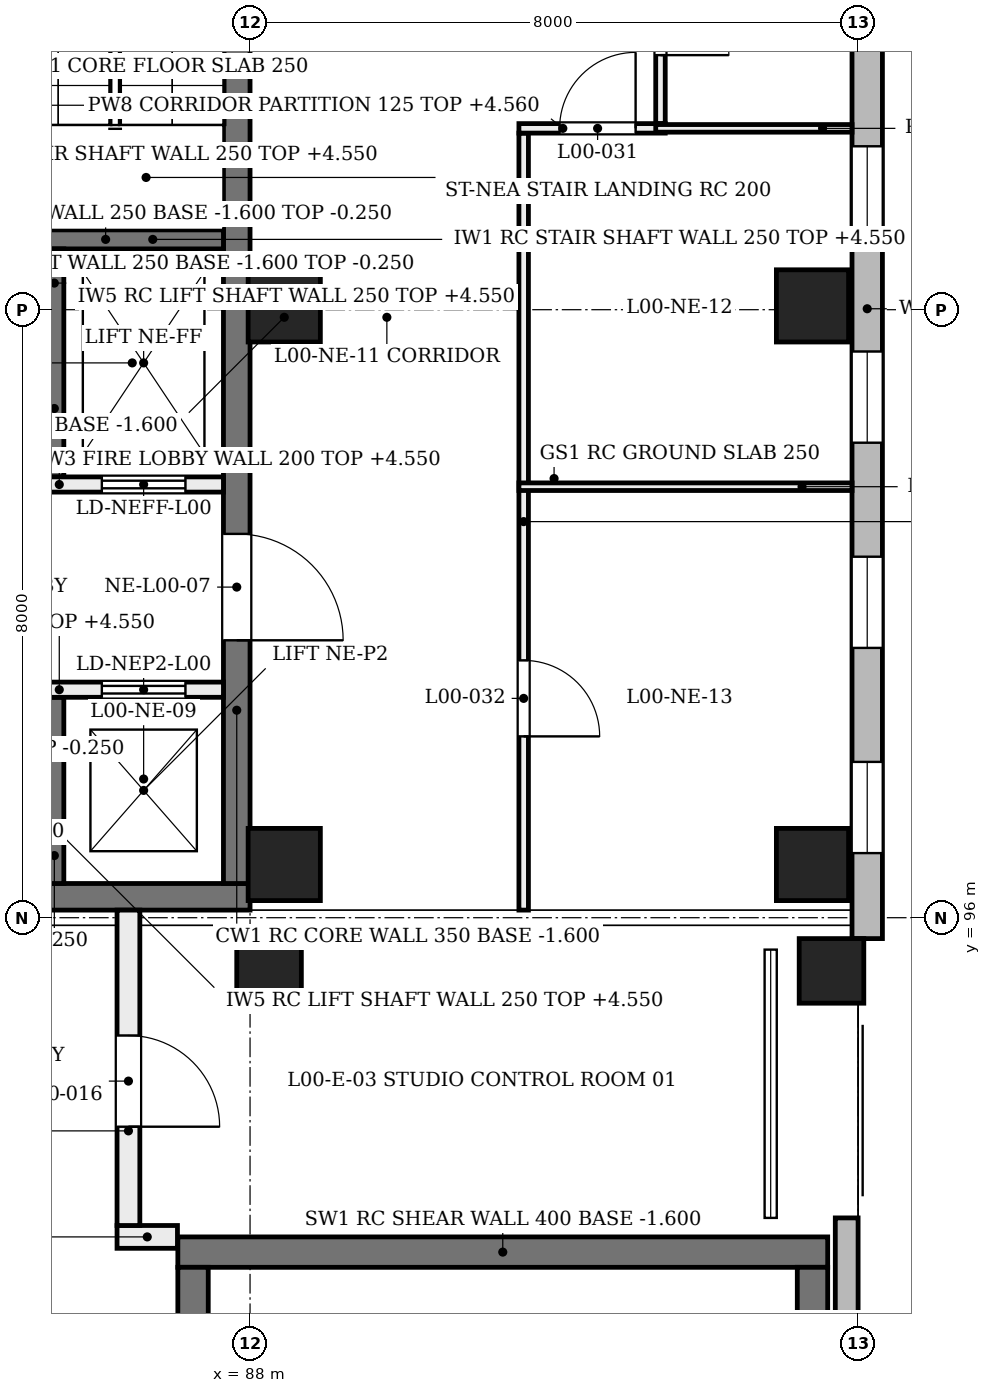
"""IFC4 building model, lengths in metres.
Left out: names, types, materials, properties, quantities, classifications, styles, units other than length and angle.
Written with IfcOpenShell. Run it as: python <this file> out.ifc"""

import sys

from ifc_helpers import new_model, si_unit, direction, frame, frame_2d, origin, origin_2d, place, context, subcontext, project, spatial, rectangle, extrude, element, fill, save


model = new_model("IFC4")
c1 = context("Model", 3, precision=1e-05, world=origin(), true_north=direction((0.0, 1.0)))
c2 = subcontext(c1, "Body", "Model", "MODEL_VIEW")
j1 = project(units=[si_unit("LENGTHUNIT", "METRE"), si_unit("PLANEANGLEUNIT", "RADIAN")], contexts=[c1])
p1 = place(None, origin())
s1 = spatial("IfcSite", under=j1, at=p1, CompositionType="ELEMENT")
p2 = place(p1, origin())
s2 = spatial("IfcBuilding", under=s1, at=p2, CompositionType="ELEMENT")
p3 = place(p2, origin())
s3 = spatial("IfcBuildingStorey", under=s2, at=p3, CompositionType="ELEMENT", Elevation=0.0)
p4 = place(p3, frame((87.05, 91.6, -1.6), z_axis=(0.0, 0.0, 1.0), x_axis=(1.0, 0.0, 0.0)))
e1 = element("IfcWall", 1, at=p4, inside=s3, PredefinedType="SHEAR", context=c2, shape_type="SweptSolid", body=[
    extrude(rectangle(XDim=8.55, YDim=0.4, at=frame_2d((4.275, 0.0))), origin(), (0.0, 0.0, 1.0), 6.18),
])
p5 = place(p3, frame((87.25, 75.8, -1.6), z_axis=(0.0, 0.0, 1.0), x_axis=(0.0, 1.0, 0.0)))
e2 = element("IfcWall", 2, at=p5, inside=s3, PredefinedType="SHEAR", context=c2, shape_type="SweptSolid", body=[
    extrude(rectangle(XDim=15.6, YDim=0.4, at=frame_2d((7.8, 0.0))), origin(), (0.0, 0.0, 1.0), 6.18),
])
p6 = place(p5, frame((6.987, 0.0, 1.6)))
e3 = element("IfcOpeningElement", 3, at=p6, cuts=e2, PredefinedType="OPENING", context=c2, shape_type="SweptSolid", body=[
    extrude(rectangle(XDim=1.4, YDim=2.4, at=frame_2d((0.7, 1.2))), frame((0.0, 0.21, 0.0), z_axis=(0.0, -1.0, 0.0), x_axis=(1.0, 0.0, 0.0)), (0.0, 0.0, 1.0), 0.42),
])
p7 = place(p3, frame((95.4, 75.8, -1.6), z_axis=(0.0, 0.0, 1.0), x_axis=(0.0, 1.0, 0.0)))
e4 = element("IfcWall", 4, at=p7, inside=s3, PredefinedType="SHEAR", context=c2, shape_type="SweptSolid", body=[
    extrude(rectangle(XDim=15.6, YDim=0.4, at=frame_2d((7.8, 0.0))), origin(), (0.0, 0.0, 1.0), 6.18),
])
p8 = place(p3, frame((79.725, 96.275, -1.6), z_axis=(0.0, 0.0, 1.0), x_axis=(1.0, 0.0, 0.0)))
e5 = element("IfcWall", 5, at=p8, inside=s3, PredefinedType="SHEAR", context=c2, shape_type="SweptSolid", body=[
    extrude(rectangle(XDim=8.275, YDim=0.35, at=frame_2d((4.137, 0.0))), origin(), (0.0, 0.0, 1.0), 6.18),
])
p9 = place(p3, frame((87.825, 96.45, -1.6), z_axis=(0.0, 0.0, 1.0), x_axis=(0.0, 1.0, 0.0)))
e6 = element("IfcWall", 6, at=p9, inside=s3, PredefinedType="SHEAR", context=c2, shape_type="SweptSolid", body=[
    extrude(rectangle(XDim=15.2, YDim=0.35, at=frame_2d((7.6, 0.0))), origin(), (0.0, 0.0, 1.0), 6.18),
])
p10 = place(p9, frame((13.25, 0.0, 1.6)))
e7 = element("IfcOpeningElement", 7, at=p10, cuts=e6, PredefinedType="OPENING", context=c2, shape_type="SweptSolid", body=[
    extrude(rectangle(XDim=1.0, YDim=2.1, at=frame_2d((0.5, 1.05))), frame((0.0, 0.185, 0.0), z_axis=(0.0, -1.0, 0.0), x_axis=(1.0, 0.0, 0.0)), (0.0, 0.0, 1.0), 0.37),
])
p11 = place(p9, frame((3.2, 0.0, 1.6)))
e8 = element("IfcOpeningElement", 8, at=p11, cuts=e6, PredefinedType="OPENING", context=c2, shape_type="SweptSolid", body=[
    extrude(rectangle(XDim=1.4, YDim=2.1, at=frame_2d((0.7, 1.05))), frame((0.0, 0.185, 0.0), z_axis=(0.0, -1.0, 0.0), x_axis=(1.0, 0.0, 0.0)), (0.0, 0.0, 1.0), 0.37),
])
for number, where, z_axis, x_axis in (
    (9, (88.45, 96.7, -1.6), (0.0, 0.0, 1.0), (1.0, 0.0, 0.0)),
    (10, (88.45, 104.05, -1.6), (0.0, 0.0, 1.0), (1.0, 0.0, 0.0)),
    (11, (95.4, 96.7, -1.6), (0.0, 0.0, 1.0), (1.0, 0.0, 0.0)),
    (12, (95.4, 104.05, -1.6), (0.0, 0.0, 1.0), (1.0, 0.0, 0.0)),
):
    element("IfcColumn", number, at=place(p3, frame(where, z_axis=z_axis, x_axis=x_axis)), inside=s3, PredefinedType="COLUMN", context=c2, shape_type="SweptSolid", body=[
        extrude(rectangle(XDim=0.95, YDim=0.95, at=origin_2d()), origin(), (0.0, 0.0, 1.0), 6.4),
    ])
for number, where, z_axis, x_axis in (
    (13, (87.667, 95.3, -1.6), (0.204, 0.0, 0.979), (0.0, 1.0, 0.0)),
    (14, (95.067, 95.3, -1.6), (0.204, 0.0, 0.979), (0.0, 1.0, 0.0)),
):
    element("IfcColumn", number, at=place(p3, frame(where, z_axis=z_axis, x_axis=x_axis)), inside=s3, PredefinedType="COLUMN", context=c2, shape_type="SweptSolid", body=[
        extrude(rectangle(XDim=0.85, YDim=0.85, at=origin_2d()), origin(), (0.0, 0.0, 1.0), 6.538),
    ])
p12 = place(p3, frame((95.85, 71.35, 0.0), z_axis=(0.0, 0.0, 1.0), x_axis=(0.0, 1.0, 0.0)))
e15 = element("IfcWall", 15, at=p12, inside=s3, PredefinedType="SOLIDWALL", context=c2, shape_type="SweptSolid", body=[
    extrude(rectangle(XDim=20.7, YDim=0.3, at=frame_2d((10.35, 0.0))), origin(), (0.0, 0.0, 1.0), 3.9),
])
p13 = place(p3, frame((96.12, 95.725, 0.0), z_axis=(0.0, 0.0, 1.0), x_axis=(0.0, 1.0, 0.0)))
e16 = element("IfcWall", 16, at=p13, inside=s3, PredefinedType="SOLIDWALL", context=c2, shape_type="SweptSolid", body=[
    extrude(rectangle(XDim=16.575, YDim=0.4, at=frame_2d((8.288, 0.0))), origin(), (0.0, 0.0, 1.0), 3.9),
])
p14 = place(p13, frame((1.125, 0.0, 1.9)))
e17 = element("IfcOpeningElement", 17, at=p14, cuts=e16, PredefinedType="OPENING", context=c2, shape_type="SweptSolid", body=[
    extrude(rectangle(XDim=1.2, YDim=1.5, at=frame_2d((0.6, 0.75))), frame((0.0, 0.21, 0.0), z_axis=(0.0, -1.0, 0.0), x_axis=(1.0, 0.0, 0.0)), (0.0, 0.0, 1.0), 0.42),
])
p15 = place(p13, frame((3.825, 0.0, 1.9)))
e18 = element("IfcOpeningElement", 18, at=p15, cuts=e16, PredefinedType="OPENING", context=c2, shape_type="SweptSolid", body=[
    extrude(rectangle(XDim=1.2, YDim=1.5, at=frame_2d((0.6, 0.75))), frame((0.0, 0.21, 0.0), z_axis=(0.0, -1.0, 0.0), x_axis=(1.0, 0.0, 0.0)), (0.0, 0.0, 1.0), 0.42),
])
p16 = place(p13, frame((6.525, 0.0, 1.9)))
e19 = element("IfcOpeningElement", 19, at=p16, cuts=e16, PredefinedType="OPENING", context=c2, shape_type="SweptSolid", body=[
    extrude(rectangle(XDim=1.2, YDim=1.5, at=frame_2d((0.6, 0.75))), frame((0.0, 0.21, 0.0), z_axis=(0.0, -1.0, 0.0), x_axis=(1.0, 0.0, 0.0)), (0.0, 0.0, 1.0), 0.42),
])
p17 = place(p13, frame((9.225, 0.0, 1.9)))
e20 = element("IfcOpeningElement", 20, at=p17, cuts=e16, PredefinedType="OPENING", context=c2, shape_type="SweptSolid", body=[
    extrude(rectangle(XDim=1.2, YDim=1.5, at=frame_2d((0.6, 0.75))), frame((0.0, 0.21, 0.0), z_axis=(0.0, -1.0, 0.0), x_axis=(1.0, 0.0, 0.0)), (0.0, 0.0, 1.0), 0.42),
])
p18 = place(p13, frame((11.925, 0.0, 1.9)))
e21 = element("IfcOpeningElement", 21, at=p18, cuts=e16, PredefinedType="OPENING", context=c2, shape_type="SweptSolid", body=[
    extrude(rectangle(XDim=1.2, YDim=1.5, at=frame_2d((0.6, 0.75))), frame((0.0, 0.21, 0.0), z_axis=(0.0, -1.0, 0.0), x_axis=(1.0, 0.0, 0.0)), (0.0, 0.0, 1.0), 0.42),
])
p19 = place(p13, frame((14.625, 0.0, 1.9)))
e22 = element("IfcOpeningElement", 22, at=p19, cuts=e16, PredefinedType="OPENING", context=c2, shape_type="SweptSolid", body=[
    extrude(rectangle(XDim=1.2, YDim=1.5, at=frame_2d((0.6, 0.75))), frame((0.0, 0.21, 0.0), z_axis=(0.0, -1.0, 0.0), x_axis=(1.0, 0.0, 0.0)), (0.0, 0.0, 1.0), 0.42),
])
p20 = place(p3, frame((87.65, 104.925, 0.0), z_axis=(0.0, 0.0, 1.0), x_axis=(-1.0, 0.0, 0.0)))
e23 = element("IfcWall", 23, at=p20, inside=s3, PredefinedType="SOLIDWALL", context=c2, shape_type="SweptSolid", body=[
    extrude(rectangle(XDim=3.1, YDim=0.25, at=frame_2d((1.55, 0.0))), origin(), (0.0, 0.0, 1.0), 4.55),
])
p21 = place(p3, frame((87.65, 104.925, -1.6), z_axis=(0.0, 0.0, 1.0), x_axis=(-1.0, 0.0, 0.0)))
e24 = element("IfcWall", 24, at=p21, inside=s3, PredefinedType="SOLIDWALL", context=c2, shape_type="SweptSolid", body=[
    extrude(rectangle(XDim=3.1, YDim=0.25, at=frame_2d((1.55, 0.0))), origin(), (0.0, 0.0, 1.0), 1.35),
])
p22 = place(p3, frame((85.425, 104.8, 0.0), z_axis=(0.0, 0.0, 1.0), x_axis=(0.0, -1.0, 0.0)))
e25 = element("IfcWall", 25, at=p22, inside=s3, PredefinedType="SOLIDWALL", context=c2, shape_type="SweptSolid", body=[
    extrude(rectangle(XDim=3.0, YDim=0.25, at=frame_2d((1.5, 0.0))), origin(), (0.0, 0.0, 1.0), 4.55),
])
p23 = place(p3, frame((85.425, 104.8, -1.6), z_axis=(0.0, 0.0, 1.0), x_axis=(0.0, -1.0, 0.0)))
e26 = element("IfcWall", 26, at=p23, inside=s3, PredefinedType="SOLIDWALL", context=c2, shape_type="SweptSolid", body=[
    extrude(rectangle(XDim=3.0, YDim=0.25, at=frame_2d((1.5, 0.0))), origin(), (0.0, 0.0, 1.0), 1.35),
])
p24 = place(p3, frame((85.425, 98.9, 0.0), z_axis=(0.0, 0.0, 1.0), x_axis=(0.0, -1.0, 0.0)))
e27 = element("IfcWall", 27, at=p24, inside=s3, PredefinedType="SOLIDWALL", context=c2, shape_type="SweptSolid", body=[
    extrude(rectangle(XDim=2.45, YDim=0.25, at=frame_2d((1.225, 0.0))), origin(), (0.0, 0.0, 1.0), 4.55),
])
p25 = place(p3, frame((85.425, 98.9, -1.6), z_axis=(0.0, 0.0, 1.0), x_axis=(0.0, -1.0, 0.0)))
e28 = element("IfcWall", 28, at=p25, inside=s3, PredefinedType="SOLIDWALL", context=c2, shape_type="SweptSolid", body=[
    extrude(rectangle(XDim=2.45, YDim=0.25, at=frame_2d((1.225, 0.0))), origin(), (0.0, 0.0, 1.0), 1.35),
])
p26 = place(p3, frame((87.65, 101.7, 0.0), z_axis=(0.0, 0.0, 1.0), x_axis=(-1.0, 0.0, 0.0)))
e29 = element("IfcWall", 29, at=p26, inside=s3, PredefinedType="SOLIDWALL", context=c2, shape_type="SweptSolid", body=[
    extrude(rectangle(XDim=7.2, YDim=0.2, at=frame_2d((3.6, 0.0))), origin(), (0.0, 0.0, 1.0), 4.55),
])
p27 = place(p26, frame((0.5, 0.0, 0.0)))
e30 = element("IfcOpeningElement", 30, at=p27, cuts=e29, PredefinedType="OPENING", context=c2, shape_type="SweptSolid", body=[
    extrude(rectangle(XDim=1.1, YDim=2.1, at=frame_2d((0.55, 1.05))), frame((0.0, 0.11, 0.0), z_axis=(0.0, -1.0, 0.0), x_axis=(1.0, 0.0, 0.0)), (0.0, 0.0, 1.0), 0.22),
])
p28 = place(p26, frame((5.6, 0.0, 0.0)))
e31 = element("IfcOpeningElement", 31, at=p28, cuts=e29, PredefinedType="OPENING", context=c2, shape_type="SweptSolid", body=[
    extrude(rectangle(XDim=1.1, YDim=2.1, at=frame_2d((0.55, 1.05))), frame((0.0, 0.11, 0.0), z_axis=(0.0, -1.0, 0.0), x_axis=(1.0, 0.0, 0.0)), (0.0, 0.0, 1.0), 0.22),
])
p29 = place(p26, frame((3.1, 0.0, 0.0)))
e32 = element("IfcOpeningElement", 32, at=p29, cuts=e29, PredefinedType="OPENING", context=c2, shape_type="SweptSolid", body=[
    extrude(rectangle(XDim=1.0, YDim=2.1, at=frame_2d((0.5, 1.05))), frame((0.0, 0.11, 0.0), z_axis=(0.0, -1.0, 0.0), x_axis=(1.0, 0.0, 0.0)), (0.0, 0.0, 1.0), 0.22),
])
p30 = place(p3, frame((87.65, 99.0, 0.0), z_axis=(0.0, 0.0, 1.0), x_axis=(-1.0, 0.0, 0.0)))
e33 = element("IfcWall", 33, at=p30, inside=s3, PredefinedType="SOLIDWALL", context=c2, shape_type="SweptSolid", body=[
    extrude(rectangle(XDim=7.2, YDim=0.2, at=frame_2d((3.6, 0.0))), origin(), (0.0, 0.0, 1.0), 4.55),
])
p31 = place(p30, frame((0.5, 0.0, 0.0)))
e34 = element("IfcOpeningElement", 34, at=p31, cuts=e33, PredefinedType="OPENING", context=c2, shape_type="SweptSolid", body=[
    extrude(rectangle(XDim=1.1, YDim=2.1, at=frame_2d((0.55, 1.05))), frame((0.0, 0.11, 0.0), z_axis=(0.0, -1.0, 0.0), x_axis=(1.0, 0.0, 0.0)), (0.0, 0.0, 1.0), 0.22),
])
p32 = place(p30, frame((5.6, 0.0, 0.0)))
e35 = element("IfcOpeningElement", 35, at=p32, cuts=e33, PredefinedType="OPENING", context=c2, shape_type="SweptSolid", body=[
    extrude(rectangle(XDim=1.1, YDim=2.1, at=frame_2d((0.55, 1.05))), frame((0.0, 0.11, 0.0), z_axis=(0.0, -1.0, 0.0), x_axis=(1.0, 0.0, 0.0)), (0.0, 0.0, 1.0), 0.22),
])
p33 = place(p30, frame((3.1, 0.0, 0.0)))
e36 = element("IfcOpeningElement", 36, at=p33, cuts=e33, PredefinedType="OPENING", context=c2, shape_type="SweptSolid", body=[
    extrude(rectangle(XDim=1.0, YDim=2.1, at=frame_2d((0.5, 1.05))), frame((0.0, 0.11, 0.0), z_axis=(0.0, -1.0, 0.0), x_axis=(1.0, 0.0, 0.0)), (0.0, 0.0, 1.0), 0.22),
])
p34 = place(p3, frame((86.25, 91.8, 0.0), z_axis=(0.0, 0.0, 1.0), x_axis=(1.0, 0.0, 0.0)))
e37 = element("IfcWall", 37, at=p34, inside=s3, PredefinedType="PARTITIONING", context=c2, shape_type="SweptSolid", body=[
    extrude(rectangle(XDim=0.795, YDim=0.3, at=frame_2d((0.397, 0.0))), origin(), (0.0, 0.0, 1.0), 4.56),
])
p35 = place(p3, frame((86.4, 91.95, 0.0), z_axis=(0.0, 0.0, 1.0), x_axis=(0.0, 1.0, 0.0)))
e38 = element("IfcWall", 38, at=p35, inside=s3, PredefinedType="PARTITIONING", context=c2, shape_type="SweptSolid", body=[
    extrude(rectangle(XDim=4.15, YDim=0.3, at=frame_2d((2.075, 0.0))), origin(), (0.0, 0.0, 1.0), 3.88),
])
p36 = place(p35, frame((1.3, 0.0, 0.0)))
e39 = element("IfcOpeningElement", 39, at=p36, cuts=e38, PredefinedType="OPENING", context=c2, shape_type="SweptSolid", body=[
    extrude(rectangle(XDim=1.2, YDim=2.2, at=frame_2d((0.6, 1.1))), frame((0.0, 0.16, 0.0), z_axis=(0.0, -1.0, 0.0), x_axis=(1.0, 0.0, 0.0)), (0.0, 0.0, 1.0), 0.32),
])
p37 = place(p3, frame((91.6, 96.1, 0.0), z_axis=(0.0, 0.0, 1.0), x_axis=(0.0, 1.0, 0.0)))
e40 = element("IfcWall", 40, at=p37, inside=s3, PredefinedType="PARTITIONING", context=c2, shape_type="SweptSolid", body=[
    extrude(rectangle(XDim=10.223, YDim=0.125, at=frame_2d((5.112, 0.0))), origin(), (0.0, 0.0, 1.0), 3.88),
])
p38 = place(p37, frame((2.286, 0.0, 0.0)))
e41 = element("IfcOpeningElement", 41, at=p38, cuts=e40, PredefinedType="OPENING", context=c2, shape_type="SweptSolid", body=[
    extrude(rectangle(XDim=1.0, YDim=2.1, at=frame_2d((0.5, 1.05))), frame((0.0, 0.073, 0.0), z_axis=(0.0, -1.0, 0.0), x_axis=(1.0, 0.0, 0.0)), (0.0, 0.0, 1.0), 0.145),
])
p39 = place(p3, frame((93.4, 106.448, 0.0), z_axis=(0.0, 0.0, 1.0), x_axis=(0.0, 1.0, 0.0)))
e42 = element("IfcWall", 42, at=p39, inside=s3, PredefinedType="PARTITIONING", context=c2, shape_type="SweptSolid", body=[
    extrude(rectangle(XDim=5.472, YDim=0.125, at=frame_2d((2.736, 0.0))), origin(), (0.0, 0.0, 1.0), 3.88),
])
p40 = place(p39, frame((3.559, 0.0, 0.0)))
e43 = element("IfcOpeningElement", 43, at=p40, cuts=e42, PredefinedType="OPENING", context=c2, shape_type="SweptSolid", body=[
    extrude(rectangle(XDim=0.9, YDim=2.1, at=frame_2d((0.45, 1.05))), frame((0.0, 0.073, 0.0), z_axis=(0.0, -1.0, 0.0), x_axis=(1.0, 0.0, 0.0)), (0.0, 0.0, 1.0), 0.145),
])
p41 = place(p39, frame((0.901, 0.0, 0.0)))
e44 = element("IfcOpeningElement", 44, at=p41, cuts=e42, PredefinedType="OPENING", context=c2, shape_type="SweptSolid", body=[
    extrude(rectangle(XDim=0.9, YDim=2.1, at=frame_2d((0.45, 1.05))), frame((0.0, 0.073, 0.0), z_axis=(0.0, -1.0, 0.0), x_axis=(1.0, 0.0, 0.0)), (0.0, 0.0, 1.0), 0.145),
])
p42 = place(p3, frame((91.538, 101.671, 0.0), z_axis=(0.0, 0.0, 1.0), x_axis=(1.0, 0.0, 0.0)))
e45 = element("IfcWall", 45, at=p42, inside=s3, PredefinedType="PARTITIONING", context=c2, shape_type="SweptSolid", body=[
    extrude(rectangle(XDim=4.382, YDim=0.1, at=frame_2d((2.191, 0.0))), origin(), (0.0, 0.0, 1.0), 3.88),
])
p43 = place(p3, frame((91.538, 106.386, 0.0), z_axis=(0.0, 0.0, 1.0), x_axis=(1.0, 0.0, 0.0)))
e46 = element("IfcWall", 46, at=p43, inside=s3, PredefinedType="PARTITIONING", context=c2, shape_type="SweptSolid", body=[
    extrude(rectangle(XDim=1.925, YDim=0.125, at=frame_2d((0.962, 0.0))), origin(), (0.0, 0.0, 1.0), 4.56),
])
p44 = place(p43, frame((0.535, 0.0, 0.0)))
e47 = element("IfcOpeningElement", 47, at=p44, cuts=e46, PredefinedType="OPENING", context=c2, shape_type="SweptSolid", body=[
    extrude(rectangle(XDim=1.0, YDim=2.1, at=frame_2d((0.5, 1.05))), frame((0.0, 0.073, 0.0), z_axis=(0.0, -1.0, 0.0), x_axis=(1.0, 0.0, 0.0)), (0.0, 0.0, 1.0), 0.145),
])
p45 = place(p3, frame((93.337, 106.386, 0.0), z_axis=(0.0, 0.0, 1.0), x_axis=(1.0, 0.0, 0.0)))
e48 = element("IfcWall", 48, at=p45, inside=s3, PredefinedType="PARTITIONING", context=c2, shape_type="SweptSolid", body=[
    extrude(rectangle(XDim=2.583, YDim=0.1, at=frame_2d((1.291, 0.0))), origin(), (0.0, 0.0, 1.0), 3.88),
])
p46 = place(p14, origin())
e49 = element("IfcWindow", 49, at=p46, inside=s3, PartitioningType="SINGLE_PANEL", PredefinedType="WINDOW", context=c2, shape_type="SweptSolid", body=[
    extrude(rectangle(XDim=1.2, YDim=1.5, at=frame_2d((0.6, 0.75))), frame((0.0, 0.03, 0.0), z_axis=(0.0, -1.0, 0.0), x_axis=(1.0, 0.0, 0.0)), (0.0, 0.0, 1.0), 0.06),
])
fill(e17, e49)
p47 = place(p15, origin())
e50 = element("IfcWindow", 50, at=p47, inside=s3, PartitioningType="SINGLE_PANEL", PredefinedType="WINDOW", context=c2, shape_type="SweptSolid", body=[
    extrude(rectangle(XDim=1.2, YDim=1.5, at=frame_2d((0.6, 0.75))), frame((0.0, 0.03, 0.0), z_axis=(0.0, -1.0, 0.0), x_axis=(1.0, 0.0, 0.0)), (0.0, 0.0, 1.0), 0.06),
])
fill(e18, e50)
p48 = place(p16, origin())
e51 = element("IfcWindow", 51, at=p48, inside=s3, PartitioningType="SINGLE_PANEL", PredefinedType="WINDOW", context=c2, shape_type="SweptSolid", body=[
    extrude(rectangle(XDim=1.2, YDim=1.5, at=frame_2d((0.6, 0.75))), frame((0.0, 0.03, 0.0), z_axis=(0.0, -1.0, 0.0), x_axis=(1.0, 0.0, 0.0)), (0.0, 0.0, 1.0), 0.06),
])
fill(e19, e51)
p49 = place(p17, origin())
e52 = element("IfcWindow", 52, at=p49, inside=s3, PartitioningType="SINGLE_PANEL", PredefinedType="WINDOW", context=c2, shape_type="SweptSolid", body=[
    extrude(rectangle(XDim=1.2, YDim=1.5, at=frame_2d((0.6, 0.75))), frame((0.0, 0.03, 0.0), z_axis=(0.0, -1.0, 0.0), x_axis=(1.0, 0.0, 0.0)), (0.0, 0.0, 1.0), 0.06),
])
fill(e20, e52)
p50 = place(p27, origin())
e53 = element("IfcDoor", 53, at=p50, inside=s3, OperationType="DOUBLE_DOOR_SLIDING", PredefinedType="DOOR", context=c2, shape_type="SweptSolid", body=[
    extrude(rectangle(XDim=1.1, YDim=2.1, at=frame_2d((0.55, 1.05))), frame((0.0, 0.025, 0.0), z_axis=(0.0, -1.0, 0.0), x_axis=(1.0, 0.0, 0.0)), (0.0, 0.0, 1.0), 0.05),
])
fill(e30, e53)
p51 = place(p31, frame((1.1, 0.0, 0.0), z_axis=(0.0, 0.0, 1.0), x_axis=(-1.0, 0.0, 0.0)))
e54 = element("IfcDoor", 54, at=p51, inside=s3, OperationType="DOUBLE_DOOR_SLIDING", PredefinedType="DOOR", context=c2, shape_type="SweptSolid", body=[
    extrude(rectangle(XDim=1.1, YDim=2.1, at=frame_2d((0.55, 1.05))), frame((0.0, 0.025, 0.0), z_axis=(0.0, -1.0, 0.0), x_axis=(1.0, 0.0, 0.0)), (0.0, 0.0, 1.0), 0.05),
])
fill(e34, e54)
p52 = place(p11, frame((1.4, 0.0, 0.0), z_axis=(0.0, 0.0, 1.0), x_axis=(-1.0, 0.0, 0.0)))
e55 = element("IfcDoor", 55, at=p52, inside=s3, OperationType="SINGLE_SWING_LEFT", PredefinedType="DOOR", context=c2, shape_type="SweptSolid", body=[
    extrude(rectangle(XDim=1.4, YDim=2.1, at=frame_2d((0.7, 1.05))), frame((0.0, 0.025, 0.0), z_axis=(0.0, -1.0, 0.0), x_axis=(1.0, 0.0, 0.0)), (0.0, 0.0, 1.0), 0.05),
])
fill(e8, e55)
p53 = place(p36, frame((1.2, 0.0, 0.0), z_axis=(0.0, 0.0, 1.0), x_axis=(-1.0, 0.0, 0.0)))
e56 = element("IfcDoor", 56, at=p53, inside=s3, OperationType="SINGLE_SWING_LEFT", PredefinedType="DOOR", context=c2, shape_type="SweptSolid", body=[
    extrude(rectangle(XDim=1.2, YDim=2.2, at=frame_2d((0.6, 1.1))), frame((0.0, 0.025, 0.0), z_axis=(0.0, -1.0, 0.0), x_axis=(1.0, 0.0, 0.0)), (0.0, 0.0, 1.0), 0.05),
])
fill(e39, e56)
p54 = place(p44, frame((1.0, 0.0, 0.0), z_axis=(0.0, 0.0, 1.0), x_axis=(-1.0, 0.0, 0.0)))
e57 = element("IfcDoor", 57, at=p54, inside=s3, OperationType="SINGLE_SWING_RIGHT", PredefinedType="DOOR", context=c2, shape_type="SweptSolid", body=[
    extrude(rectangle(XDim=1.0, YDim=2.1, at=frame_2d((0.5, 1.05))), frame((0.0, 0.025, 0.0), z_axis=(0.0, -1.0, 0.0), x_axis=(1.0, 0.0, 0.0)), (0.0, 0.0, 1.0), 0.05),
])
fill(e47, e57)
p55 = place(p38, frame((1.0, 0.0, 0.0), z_axis=(0.0, 0.0, 1.0), x_axis=(-1.0, 0.0, 0.0)))
e58 = element("IfcDoor", 58, at=p55, inside=s3, OperationType="SINGLE_SWING_LEFT", PredefinedType="DOOR", context=c2, shape_type="SweptSolid", body=[
    extrude(rectangle(XDim=1.0, YDim=2.1, at=frame_2d((0.5, 1.05))), frame((0.0, 0.025, 0.0), z_axis=(0.0, -1.0, 0.0), x_axis=(1.0, 0.0, 0.0)), (0.0, 0.0, 1.0), 0.05),
])
fill(e41, e58)
p56 = place(p41, frame((0.9, 0.0, 0.0), z_axis=(0.0, 0.0, 1.0), x_axis=(-1.0, 0.0, 0.0)))
e59 = element("IfcDoor", 59, at=p56, inside=s3, OperationType="SINGLE_SWING_LEFT", PredefinedType="DOOR", context=c2, shape_type="SweptSolid", body=[
    extrude(rectangle(XDim=0.9, YDim=2.1, at=frame_2d((0.45, 1.05))), frame((0.0, 0.025, 0.0), z_axis=(0.0, -1.0, 0.0), x_axis=(1.0, 0.0, 0.0)), (0.0, 0.0, 1.0), 0.05),
])
fill(e44, e59)
save(model, sys.argv[1])
